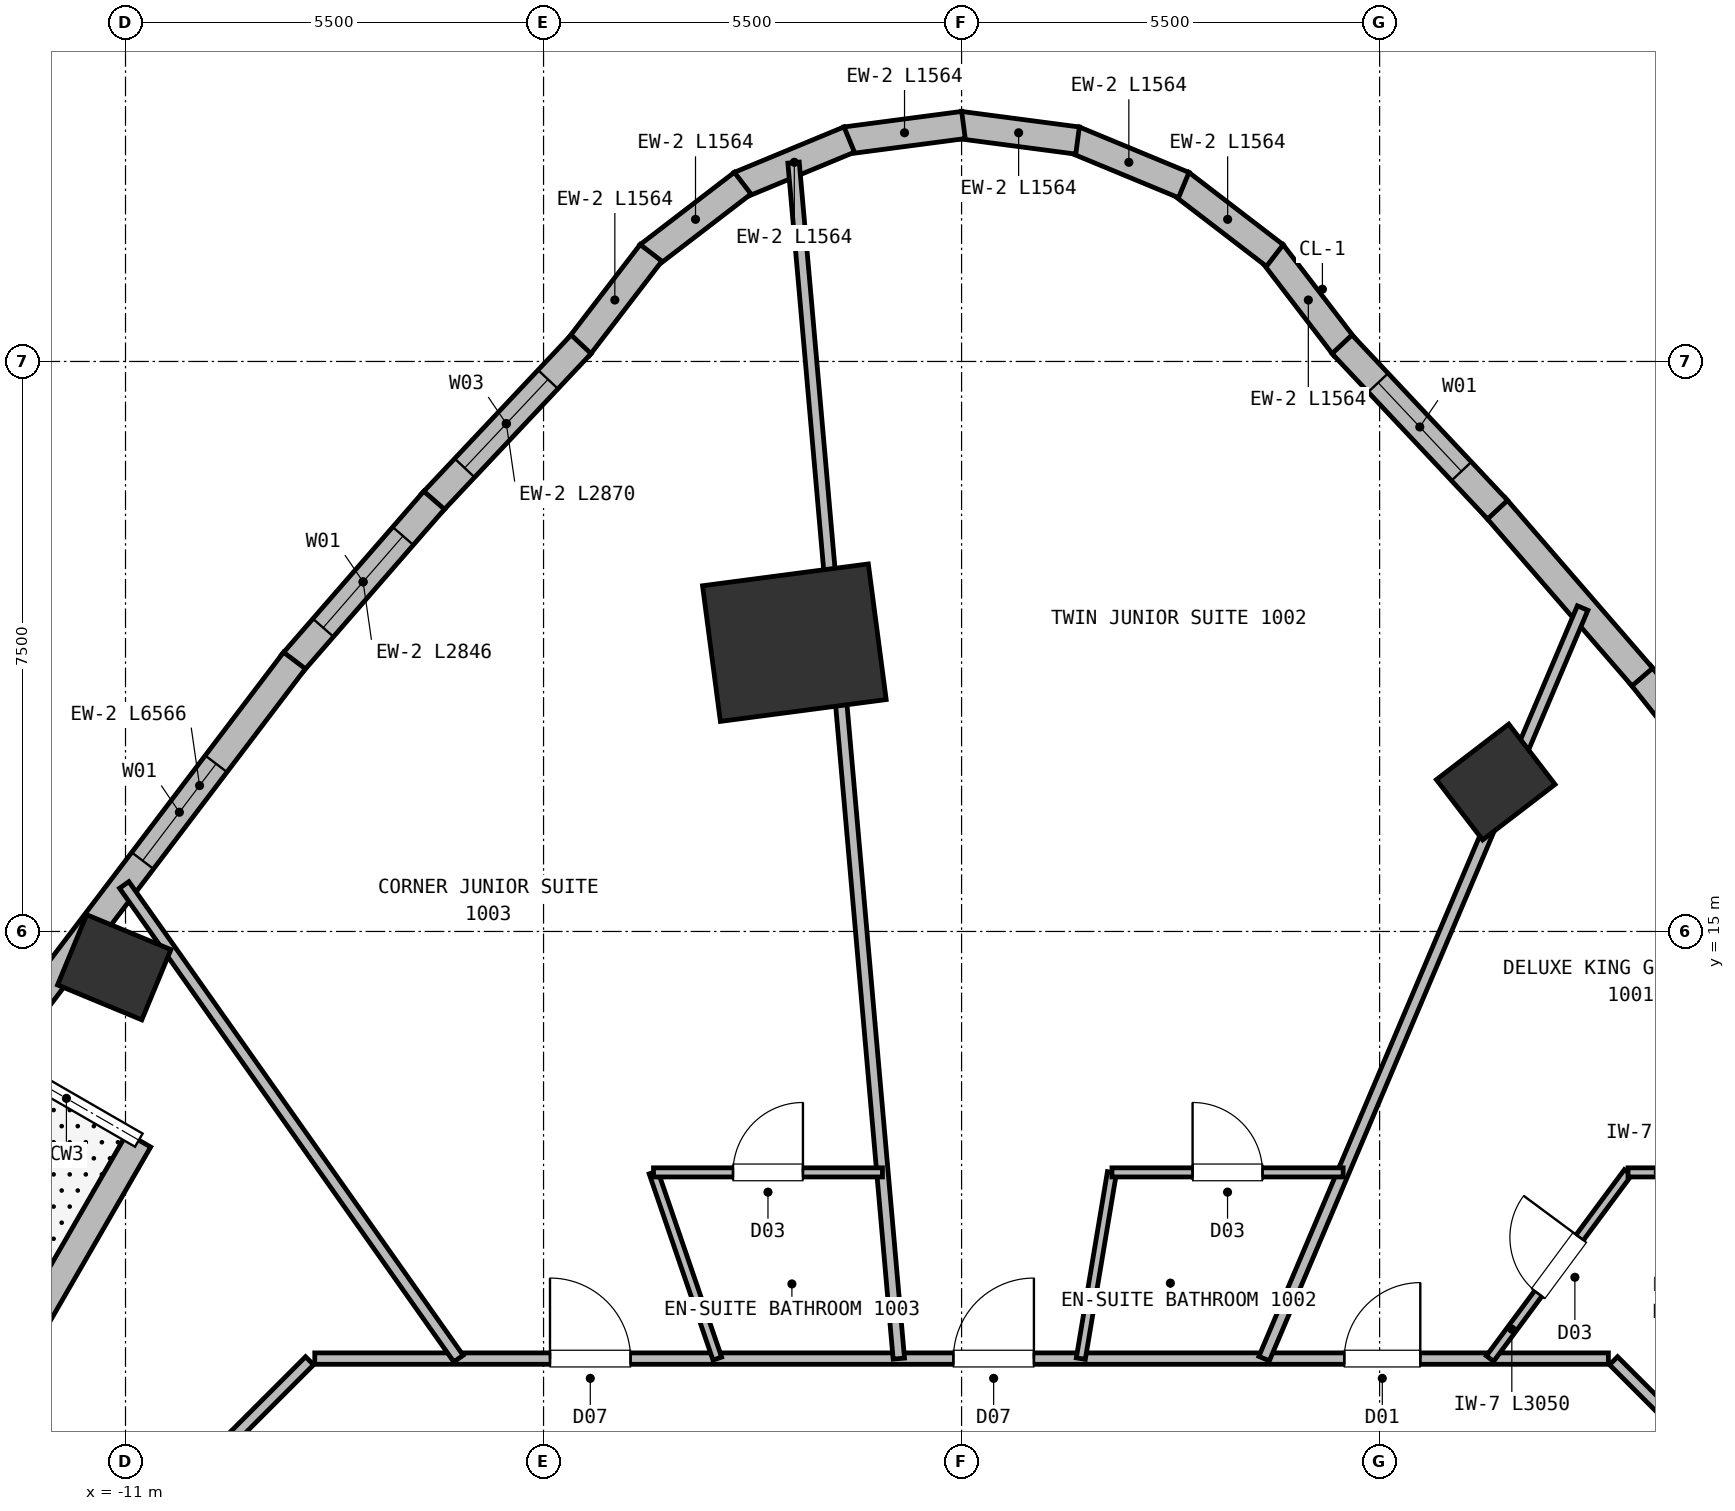
"""IFC4 building model, lengths in metres.
Left out: names, types, materials, properties, quantities, classifications, styles, units other than length and angle.
Written with IfcOpenShell. Run it as: python <this file> out.ifc"""

import sys

from ifc_helpers import new_model, si_unit, direction, frame, frame_2d, origin, origin_2d, place, context, subcontext, project, spatial, rectangle, extrude, element, fill, save


model = new_model("IFC4")
c1 = context("Model", 3, precision=1e-05, world=origin(), true_north=direction((0.0, 1.0)))
c2 = subcontext(c1, "Body", "Model", "MODEL_VIEW")
j1 = project(units=[si_unit("LENGTHUNIT", "METRE"), si_unit("PLANEANGLEUNIT", "RADIAN")], contexts=[c1])
p1 = place(None, origin())
s1 = spatial("IfcSite", under=j1, at=p1, CompositionType="ELEMENT")
p2 = place(p1, origin())
s2 = spatial("IfcBuilding", under=s1, at=p2, CompositionType="ELEMENT")
p3 = place(p2, frame((0.0, 0.0, 34.25)))
s3 = spatial("IfcBuildingStorey", under=s2, at=p3, CompositionType="ELEMENT", Elevation=34.25)
p4 = place(p3, frame((-2.2, 18.8, 0.0), z_axis=(0.0, 0.0, 1.0), x_axis=(-0.13052619222, 0.991444861374, 0.0)))
e1 = element("IfcColumn", 1, at=p4, inside=s3, PredefinedType="COLUMN", context=c2, shape_type="SweptSolid", body=[
    extrude(rectangle(XDim=1.8, YDim=2.2, at=origin_2d()), origin(), (0.0, 0.0, 1.0), 3.75),
])
for number, where, z_axis, x_axis in (
    (2, (-11.148, 14.529, 0.0), (0.0, 0.0, 1.0), (0.383, 0.924, 0.0)),
    (3, (7.028, 16.966, 0.0), (0.0, 0.0, 1.0), (-0.609, 0.793, 0.0)),
):
    element("IfcColumn", number, at=place(p3, frame(where, z_axis=z_axis, x_axis=x_axis)), inside=s3, PredefinedType="COLUMN", context=c2, shape_type="SweptSolid", body=[
        extrude(rectangle(XDim=1.0, YDim=1.2, at=origin_2d()), origin(), (0.0, 0.0, 1.0), 3.75),
    ])
p5 = place(p3, frame((-16.025, 3.248, 0.0), z_axis=(0.0, 0.0, 1.0), x_axis=(0.499999493275, 0.866025696342, 0.0)))
e4 = element("IfcWall", 4, at=p5, inside=s3, PredefinedType="SOLIDWALL", context=c2, shape_type="SweptSolid", body=[
    extrude(rectangle(XDim=10.4, YDim=0.36, at=frame_2d((5.2, 0.0))), origin(), (0.0, 0.0, 1.0), 3.5),
])
p6 = place(p5, frame((4.375, 0.0, 0.0)))
e5 = element("IfcOpeningElement", 5, at=p6, cuts=e4, PredefinedType="OPENING", context=c2, shape_type="SweptSolid", body=[
    extrude(rectangle(XDim=1.65, YDim=2.25, at=frame_2d((0.825, 1.125))), frame((0.0, 0.19, 0.0), z_axis=(0.0, -1.0, 0.0), x_axis=(1.0, 0.0, 0.0)), (0.0, 0.0, 1.0), 0.38),
])
for number, where, z_axis, x_axis in (
    (6, (4.086, 23.929, 0.0), (0.0, 0.0, 1.0), (0.609, -0.793, 0.0)),
    (7, (2.88, 24.846, 0.0), (0.0, 0.0, 1.0), (0.793, -0.609, 0.0)),
    (8, (1.478, 25.42, 0.0), (0.0, 0.0, 1.0), (0.924, -0.383, 0.0)),
    (9, (-0.025, 25.611, 0.0), (0.0, 0.0, 1.0), (0.991, -0.13, 0.0)),
    (10, (-1.526, 25.407, 0.0), (0.0, 0.0, 1.0), (0.991, 0.13, 0.0)),
    (11, (-2.923, 24.821, 0.0), (0.0, 0.0, 1.0), (0.924, 0.383, 0.0)),
    (12, (-4.121, 23.894, 0.0), (0.0, 0.0, 1.0), (0.793, 0.609, 0.0)),
    (13, (-5.038, 22.688, 0.0), (0.0, 0.0, 1.0), (0.609, 0.793, 0.0)),
):
    element("IfcWall", number, at=place(p3, frame(where, z_axis=z_axis, x_axis=x_axis)), inside=s3, PredefinedType="SOLIDWALL", context=c2, shape_type="SweptSolid", body=[
        extrude(rectangle(XDim=1.564, YDim=0.36, at=frame_2d((0.782, 0.0))), origin(), (0.0, 0.0, 1.0), 3.5),
    ])
p7 = place(p3, frame((-6.973, 20.637, 0.0), z_axis=(0.0, 0.0, 1.0), x_axis=(0.685563685899, 0.728012659626, 0.0)))
e14 = element("IfcWall", 14, at=p7, inside=s3, PredefinedType="SOLIDWALL", context=c2, shape_type="SweptSolid", body=[
    extrude(rectangle(XDim=2.87, YDim=0.36, at=frame_2d((1.435, 0.0))), origin(), (0.0, 0.0, 1.0), 3.5),
])
p8 = place(p7, frame((0.635, 0.0, 0.72)))
e15 = element("IfcOpeningElement", 15, at=p8, cuts=e14, PredefinedType="OPENING", context=c2, shape_type="SweptSolid", body=[
    extrude(rectangle(XDim=1.6, YDim=1.88, at=frame_2d((0.8, 0.94))), frame((0.0, 0.19, 0.0), z_axis=(0.0, -1.0, 0.0), x_axis=(1.0, 0.0, 0.0)), (0.0, 0.0, 1.0), 0.38),
])
p9 = place(p3, frame((-8.808, 18.526, 0.0), z_axis=(0.0, 0.0, 1.0), x_axis=(0.656480194697, 0.754343260042, 0.0)))
e16 = element("IfcWall", 16, at=p9, inside=s3, PredefinedType="SOLIDWALL", context=c2, shape_type="SweptSolid", body=[
    extrude(rectangle(XDim=2.846, YDim=0.36, at=frame_2d((1.423, 0.0))), origin(), (0.0, 0.0, 1.0), 3.5),
])
p10 = place(p9, frame((0.623, 0.0, 0.72)))
e17 = element("IfcOpeningElement", 17, at=p10, cuts=e16, PredefinedType="OPENING", context=c2, shape_type="SweptSolid", body=[
    extrude(rectangle(XDim=1.6, YDim=1.88, at=frame_2d((0.8, 0.94))), frame((0.0, 0.19, 0.0), z_axis=(0.0, -1.0, 0.0), x_axis=(1.0, 0.0, 0.0)), (0.0, 0.0, 1.0), 0.38),
])
p11 = place(p3, frame((-12.745, 13.334, 0.0), z_axis=(0.0, 0.0, 1.0), x_axis=(0.604405198851, 0.796677071091, 0.0)))
e18 = element("IfcWall", 18, at=p11, inside=s3, PredefinedType="SOLIDWALL", context=c2, shape_type="SweptSolid", body=[
    extrude(rectangle(XDim=6.566, YDim=0.36, at=frame_2d((3.283, 0.0))), origin(), (0.0, 0.0, 1.0), 2.93),
])
p12 = place(p11, frame((3.26, 0.0, 0.72)))
e19 = element("IfcOpeningElement", 19, at=p12, cuts=e18, PredefinedType="OPENING", context=c2, shape_type="SweptSolid", body=[
    extrude(rectangle(XDim=1.6, YDim=1.88, at=frame_2d((0.8, 0.94))), frame((0.0, 0.19, 0.0), z_axis=(0.0, -1.0, 0.0), x_axis=(1.0, 0.0, 0.0)), (0.0, 0.0, 1.0), 0.38),
])
p13 = place(p3, frame((8.925, 18.387, 0.0), z_axis=(0.0, 0.0, 1.0), x_axis=(0.622637946995, -0.782510055502, 0.0)))
e20 = element("IfcWall", 20, at=p13, inside=s3, PredefinedType="SOLIDWALL", context=c2, shape_type="SweptSolid", body=[
    extrude(rectangle(XDim=2.941, YDim=0.36, at=frame_2d((1.471, 0.0))), origin(), (0.0, 0.0, 1.0), 3.5),
])
p14 = place(p13, frame((0.67, 0.0, 0.72)))
e21 = element("IfcOpeningElement", 21, at=p14, cuts=e20, PredefinedType="OPENING", context=c2, shape_type="SweptSolid", body=[
    extrude(rectangle(XDim=1.6, YDim=1.88, at=frame_2d((0.8, 0.94))), frame((0.0, 0.19, 0.0), z_axis=(0.0, -1.0, 0.0), x_axis=(1.0, 0.0, 0.0)), (0.0, 0.0, 1.0), 0.38),
])
p15 = place(p3, frame((7.018, 20.587, 0.0), z_axis=(0.0, 0.0, 1.0), x_axis=(0.654585220283, -0.755988220402, 0.0)))
e22 = element("IfcWall", 22, at=p15, inside=s3, PredefinedType="SOLIDWALL", context=c2, shape_type="SweptSolid", body=[
    extrude(rectangle(XDim=2.961, YDim=0.36, at=frame_2d((1.481, 0.0))), origin(), (0.0, 0.0, 1.0), 3.5),
])
p16 = place(p3, frame((5.006, 22.726, 0.0), z_axis=(0.0, 0.0, 1.0), x_axis=(0.684946458387, -0.728593404542, 0.0)))
e23 = element("IfcWall", 23, at=p16, inside=s3, PredefinedType="SOLIDWALL", context=c2, shape_type="SweptSolid", body=[
    extrude(rectangle(XDim=2.987, YDim=0.36, at=frame_2d((1.494, 0.0))), origin(), (0.0, 0.0, 1.0), 3.5),
])
p17 = place(p16, frame((0.694, 0.0, 0.72)))
e24 = element("IfcOpeningElement", 24, at=p17, cuts=e23, PredefinedType="OPENING", context=c2, shape_type="SweptSolid", body=[
    extrude(rectangle(XDim=1.6, YDim=1.88, at=frame_2d((0.8, 0.94))), frame((0.0, 0.19, 0.0), z_axis=(0.0, -1.0, 0.0), x_axis=(1.0, 0.0, 0.0)), (0.0, 0.0, 1.0), 0.38),
])
p18 = place(p3, frame((8.578, 9.352, 0.0), z_axis=(0.0, 0.0, 1.0), x_axis=(0.707067066127, -0.707146494016, 0.0)))
e25 = element("IfcWall", 25, at=p18, inside=s3, PredefinedType="PARTITIONING", context=c2, shape_type="SweptSolid", body=[
    extrude(rectangle(XDim=3.074, YDim=0.15, at=frame_2d((1.537, 0.0))), origin(), (0.0, 0.0, 1.0), 3.5),
])
p19 = place(p3, frame((-8.51, 9.38, 0.0), z_axis=(0.0, 0.0, 1.0), x_axis=(1.0, 0.0, 0.0)))
e26 = element("IfcWall", 26, at=p19, inside=s3, PredefinedType="PARTITIONING", context=c2, shape_type="SweptSolid", body=[
    extrude(rectangle(XDim=17.02, YDim=0.15, at=frame_2d((8.51, 0.0))), origin(), (0.0, 0.0, 1.0), 3.5),
])
p20 = place(p19, frame((13.545, 0.0, 0.0)))
e27 = element("IfcOpeningElement", 27, at=p20, cuts=e26, PredefinedType="OPENING", context=c2, shape_type="SweptSolid", body=[
    extrude(rectangle(XDim=1.0, YDim=2.15, at=frame_2d((0.5, 1.075))), frame((0.0, 0.085, 0.0), z_axis=(0.0, -1.0, 0.0), x_axis=(1.0, 0.0, 0.0)), (0.0, 0.0, 1.0), 0.17),
])
p21 = place(p19, frame((3.095, 0.0, 0.0)))
e28 = element("IfcOpeningElement", 28, at=p21, cuts=e26, PredefinedType="OPENING", context=c2, shape_type="SweptSolid", body=[
    extrude(rectangle(XDim=1.06, YDim=2.15, at=frame_2d((0.53, 1.075))), frame((0.0, 0.085, 0.0), z_axis=(0.0, -1.0, 0.0), x_axis=(1.0, 0.0, 0.0)), (0.0, 0.0, 1.0), 0.17),
])
p22 = place(p19, frame((8.402, 0.0, 0.0)))
e29 = element("IfcOpeningElement", 29, at=p22, cuts=e26, PredefinedType="OPENING", context=c2, shape_type="SweptSolid", body=[
    extrude(rectangle(XDim=1.06, YDim=2.15, at=frame_2d((0.53, 1.075))), frame((0.0, 0.085, 0.0), z_axis=(0.0, -1.0, 0.0), x_axis=(1.0, 0.0, 0.0)), (0.0, 0.0, 1.0), 0.17),
])
p23 = place(p3, frame((-10.752, 7.178, 0.0), z_axis=(0.0, 0.0, 1.0), x_axis=(0.707067066127, 0.707146494016, 0.0)))
e30 = element("IfcWall", 30, at=p23, inside=s3, PredefinedType="PARTITIONING", context=c2, shape_type="SweptSolid", body=[
    extrude(rectangle(XDim=3.074, YDim=0.15, at=frame_2d((1.537, 0.0))), origin(), (0.0, 0.0, 1.0), 3.5),
])
p24 = place(p3, frame((6.952, 9.38, 0.0), z_axis=(0.0, 0.0, 1.0), x_axis=(0.595378789074, 0.80344514282, 0.0)))
e31 = element("IfcWall", 31, at=p24, inside=s3, PredefinedType="PARTITIONING", context=c2, shape_type="SweptSolid", body=[
    extrude(rectangle(XDim=3.05, YDim=0.12, at=frame_2d((1.525, 0.0))), origin(), (0.0, 0.0, 1.0), 3.5),
])
p25 = place(p24, frame((1.065, 0.0, 0.0)))
e32 = element("IfcOpeningElement", 32, at=p25, cuts=e31, PredefinedType="OPENING", context=c2, shape_type="SweptSolid", body=[
    extrude(rectangle(XDim=0.92, YDim=2.1, at=frame_2d((0.46, 1.05))), frame((0.0, 0.07, 0.0), z_axis=(0.0, -1.0, 0.0), x_axis=(1.0, 0.0, 0.0)), (0.0, 0.0, 1.0), 0.14),
])
p26 = place(p3, frame((8.768, 11.83, 0.0), z_axis=(0.0, 0.0, 1.0), x_axis=(1.0, 0.0, 0.0)))
e33 = element("IfcWall", 33, at=p26, inside=s3, PredefinedType="PARTITIONING", context=c2, shape_type="SweptSolid", body=[
    extrude(rectangle(XDim=0.797, YDim=0.12, at=frame_2d((0.398, 0.0))), origin(), (0.0, 0.0, 1.0), 3.5),
])
p27 = place(p3, frame((3.98, 9.38, 0.0), z_axis=(0.0, 0.0, 1.0), x_axis=(0.390626405148, 0.920549298843, 0.0)))
e34 = element("IfcWall", 34, at=p27, inside=s3, PredefinedType="PARTITIONING", context=c2, shape_type="SweptSolid", body=[
    extrude(rectangle(XDim=10.728, YDim=0.15, at=frame_2d((5.364, 0.0))), origin(), (0.0, 0.0, 1.0), 3.5),
])
p28 = place(p3, frame((1.569, 9.38, 0.0), z_axis=(0.0, 0.0, 1.0), x_axis=(0.165004545821, 0.98629280635, 0.0)))
e35 = element("IfcWall", 35, at=p28, inside=s3, PredefinedType="PARTITIONING", context=c2, shape_type="SweptSolid", body=[
    extrude(rectangle(XDim=2.484, YDim=0.12, at=frame_2d((1.242, 0.0))), origin(), (0.0, 0.0, 1.0), 3.5),
])
p29 = place(p3, frame((1.979, 11.83, 0.0), z_axis=(0.0, 0.0, 1.0), x_axis=(1.0, 0.0, 0.0)))
e36 = element("IfcWall", 36, at=p29, inside=s3, PredefinedType="PARTITIONING", context=c2, shape_type="SweptSolid", body=[
    extrude(rectangle(XDim=3.042, YDim=0.12, at=frame_2d((1.521, 0.0))), origin(), (0.0, 0.0, 1.0), 3.5),
])
p30 = place(p29, frame((1.061, 0.0, 0.0)))
e37 = element("IfcOpeningElement", 37, at=p30, cuts=e36, PredefinedType="OPENING", context=c2, shape_type="SweptSolid", body=[
    extrude(rectangle(XDim=0.92, YDim=2.1, at=frame_2d((0.46, 1.05))), frame((0.0, 0.07, 0.0), z_axis=(0.0, -1.0, 0.0), x_axis=(1.0, 0.0, 0.0)), (0.0, 0.0, 1.0), 0.14),
])
p31 = place(p3, frame((-0.826, 9.38, 0.0), z_axis=(0.0, 0.0, 1.0), x_axis=(-0.087674603254, 0.996149167517, 0.0)))
e38 = element("IfcWall", 38, at=p31, inside=s3, PredefinedType="PARTITIONING", context=c2, shape_type="SweptSolid", body=[
    extrude(rectangle(XDim=15.797, YDim=0.15, at=frame_2d((7.898, 0.0))), origin(), (0.0, 0.0, 1.0), 3.5),
])
p32 = place(p3, frame((-4.053, 11.83, 0.0), z_axis=(0.0, 0.0, 1.0), x_axis=(0.324078497959, -0.946030193578, 0.0)))
e39 = element("IfcWall", 39, at=p32, inside=s3, PredefinedType="PARTITIONING", context=c2, shape_type="SweptSolid", body=[
    extrude(rectangle(XDim=2.59, YDim=0.12, at=frame_2d((1.295, 0.0))), origin(), (0.0, 0.0, 1.0), 3.5),
])
p33 = place(p3, frame((-4.053, 11.83, 0.0), z_axis=(0.0, 0.0, 1.0), x_axis=(1.0, 0.0, 0.0)))
e40 = element("IfcWall", 40, at=p33, inside=s3, PredefinedType="PARTITIONING", context=c2, shape_type="SweptSolid", body=[
    extrude(rectangle(XDim=3.012, YDim=0.12, at=frame_2d((1.506, 0.0))), origin(), (0.0, 0.0, 1.0), 3.5),
])
p34 = place(p33, frame((1.046, 0.0, 0.0)))
e41 = element("IfcOpeningElement", 41, at=p34, cuts=e40, PredefinedType="OPENING", context=c2, shape_type="SweptSolid", body=[
    extrude(rectangle(XDim=0.92, YDim=2.1, at=frame_2d((0.46, 1.05))), frame((0.0, 0.07, 0.0), z_axis=(0.0, -1.0, 0.0), x_axis=(1.0, 0.0, 0.0)), (0.0, 0.0, 1.0), 0.14),
])
p35 = place(p3, frame((-6.619, 9.38, 0.0), z_axis=(0.0, 0.0, 1.0), x_axis=(-0.576560044714, 0.817054780807, 0.0)))
e42 = element("IfcWall", 42, at=p35, inside=s3, PredefinedType="PARTITIONING", context=c2, shape_type="SweptSolid", body=[
    extrude(rectangle(XDim=7.628, YDim=0.15, at=frame_2d((3.814, 0.0))), origin(), (0.0, 0.0, 1.0), 3.5),
])
p36 = place(p8, origin())
e43 = element("IfcWindow", 43, at=p36, inside=s3, PartitioningType="SINGLE_PANEL", PredefinedType="WINDOW", context=c2, shape_type="SweptSolid", body=[
    extrude(rectangle(XDim=1.6, YDim=1.88, at=frame_2d((0.8, 0.94))), frame((0.0, 0.03, 0.0), z_axis=(0.0, -1.0, 0.0), x_axis=(1.0, 0.0, 0.0)), (0.0, 0.0, 1.0), 0.06),
])
fill(e15, e43)
p37 = place(p10, origin())
e44 = element("IfcWindow", 44, at=p37, inside=s3, PartitioningType="SINGLE_PANEL", PredefinedType="WINDOW", context=c2, shape_type="SweptSolid", body=[
    extrude(rectangle(XDim=1.6, YDim=1.88, at=frame_2d((0.8, 0.94))), frame((0.0, 0.03, 0.0), z_axis=(0.0, -1.0, 0.0), x_axis=(1.0, 0.0, 0.0)), (0.0, 0.0, 1.0), 0.06),
])
fill(e17, e44)
p38 = place(p12, origin())
e45 = element("IfcWindow", 45, at=p38, inside=s3, PartitioningType="SINGLE_PANEL", PredefinedType="WINDOW", context=c2, shape_type="SweptSolid", body=[
    extrude(rectangle(XDim=1.6, YDim=1.88, at=frame_2d((0.8, 0.94))), frame((0.0, 0.03, 0.0), z_axis=(0.0, -1.0, 0.0), x_axis=(1.0, 0.0, 0.0)), (0.0, 0.0, 1.0), 0.06),
])
fill(e19, e45)
p39 = place(p17, origin())
e46 = element("IfcWindow", 46, at=p39, inside=s3, PartitioningType="SINGLE_PANEL", PredefinedType="WINDOW", context=c2, shape_type="SweptSolid", body=[
    extrude(rectangle(XDim=1.6, YDim=1.88, at=frame_2d((0.8, 0.94))), frame((0.0, 0.03, 0.0), z_axis=(0.0, -1.0, 0.0), x_axis=(1.0, 0.0, 0.0)), (0.0, 0.0, 1.0), 0.06),
])
fill(e24, e46)
p40 = place(p25, origin())
e47 = element("IfcDoor", 47, at=p40, inside=s3, OperationType="SINGLE_SWING_RIGHT", PredefinedType="DOOR", context=c2, shape_type="SweptSolid", body=[
    extrude(rectangle(XDim=0.92, YDim=2.1, at=frame_2d((0.46, 1.05))), frame((0.0, 0.025, 0.0), z_axis=(0.0, -1.0, 0.0), x_axis=(1.0, 0.0, 0.0)), (0.0, 0.0, 1.0), 0.05),
])
fill(e32, e47)
p41 = place(p30, origin())
e48 = element("IfcDoor", 48, at=p41, inside=s3, OperationType="SINGLE_SWING_LEFT", PredefinedType="DOOR", context=c2, shape_type="SweptSolid", body=[
    extrude(rectangle(XDim=0.92, YDim=2.1, at=frame_2d((0.46, 1.05))), frame((0.0, 0.025, 0.0), z_axis=(0.0, -1.0, 0.0), x_axis=(1.0, 0.0, 0.0)), (0.0, 0.0, 1.0), 0.05),
])
fill(e37, e48)
p42 = place(p34, origin())
e49 = element("IfcDoor", 49, at=p42, inside=s3, OperationType="SINGLE_SWING_RIGHT", PredefinedType="DOOR", context=c2, shape_type="SweptSolid", body=[
    extrude(rectangle(XDim=0.92, YDim=2.1, at=frame_2d((0.46, 1.05))), frame((0.0, 0.025, 0.0), z_axis=(0.0, -1.0, 0.0), x_axis=(1.0, 0.0, 0.0)), (0.0, 0.0, 1.0), 0.05),
])
fill(e41, e49)
p43 = place(p20, origin())
e50 = element("IfcDoor", 50, at=p43, inside=s3, OperationType="SINGLE_SWING_RIGHT", PredefinedType="DOOR", context=c2, shape_type="SweptSolid", body=[
    extrude(rectangle(XDim=1.0, YDim=2.15, at=frame_2d((0.5, 1.075))), frame((0.0, 0.025, 0.0), z_axis=(0.0, -1.0, 0.0), x_axis=(1.0, 0.0, 0.0)), (0.0, 0.0, 1.0), 0.05),
])
fill(e27, e50)
p44 = place(p21, origin())
e51 = element("IfcDoor", 51, at=p44, inside=s3, OperationType="SINGLE_SWING_LEFT", PredefinedType="DOOR", context=c2, shape_type="SweptSolid", body=[
    extrude(rectangle(XDim=1.06, YDim=2.15, at=frame_2d((0.53, 1.075))), frame((0.0, 0.025, 0.0), z_axis=(0.0, -1.0, 0.0), x_axis=(1.0, 0.0, 0.0)), (0.0, 0.0, 1.0), 0.05),
])
fill(e28, e51)
p45 = place(p22, origin())
e52 = element("IfcDoor", 52, at=p45, inside=s3, OperationType="SINGLE_SWING_RIGHT", PredefinedType="DOOR", context=c2, shape_type="SweptSolid", body=[
    extrude(rectangle(XDim=1.06, YDim=2.15, at=frame_2d((0.53, 1.075))), frame((0.0, 0.025, 0.0), z_axis=(0.0, -1.0, 0.0), x_axis=(1.0, 0.0, 0.0)), (0.0, 0.0, 1.0), 0.05),
])
fill(e29, e52)
save(model, sys.argv[1])
